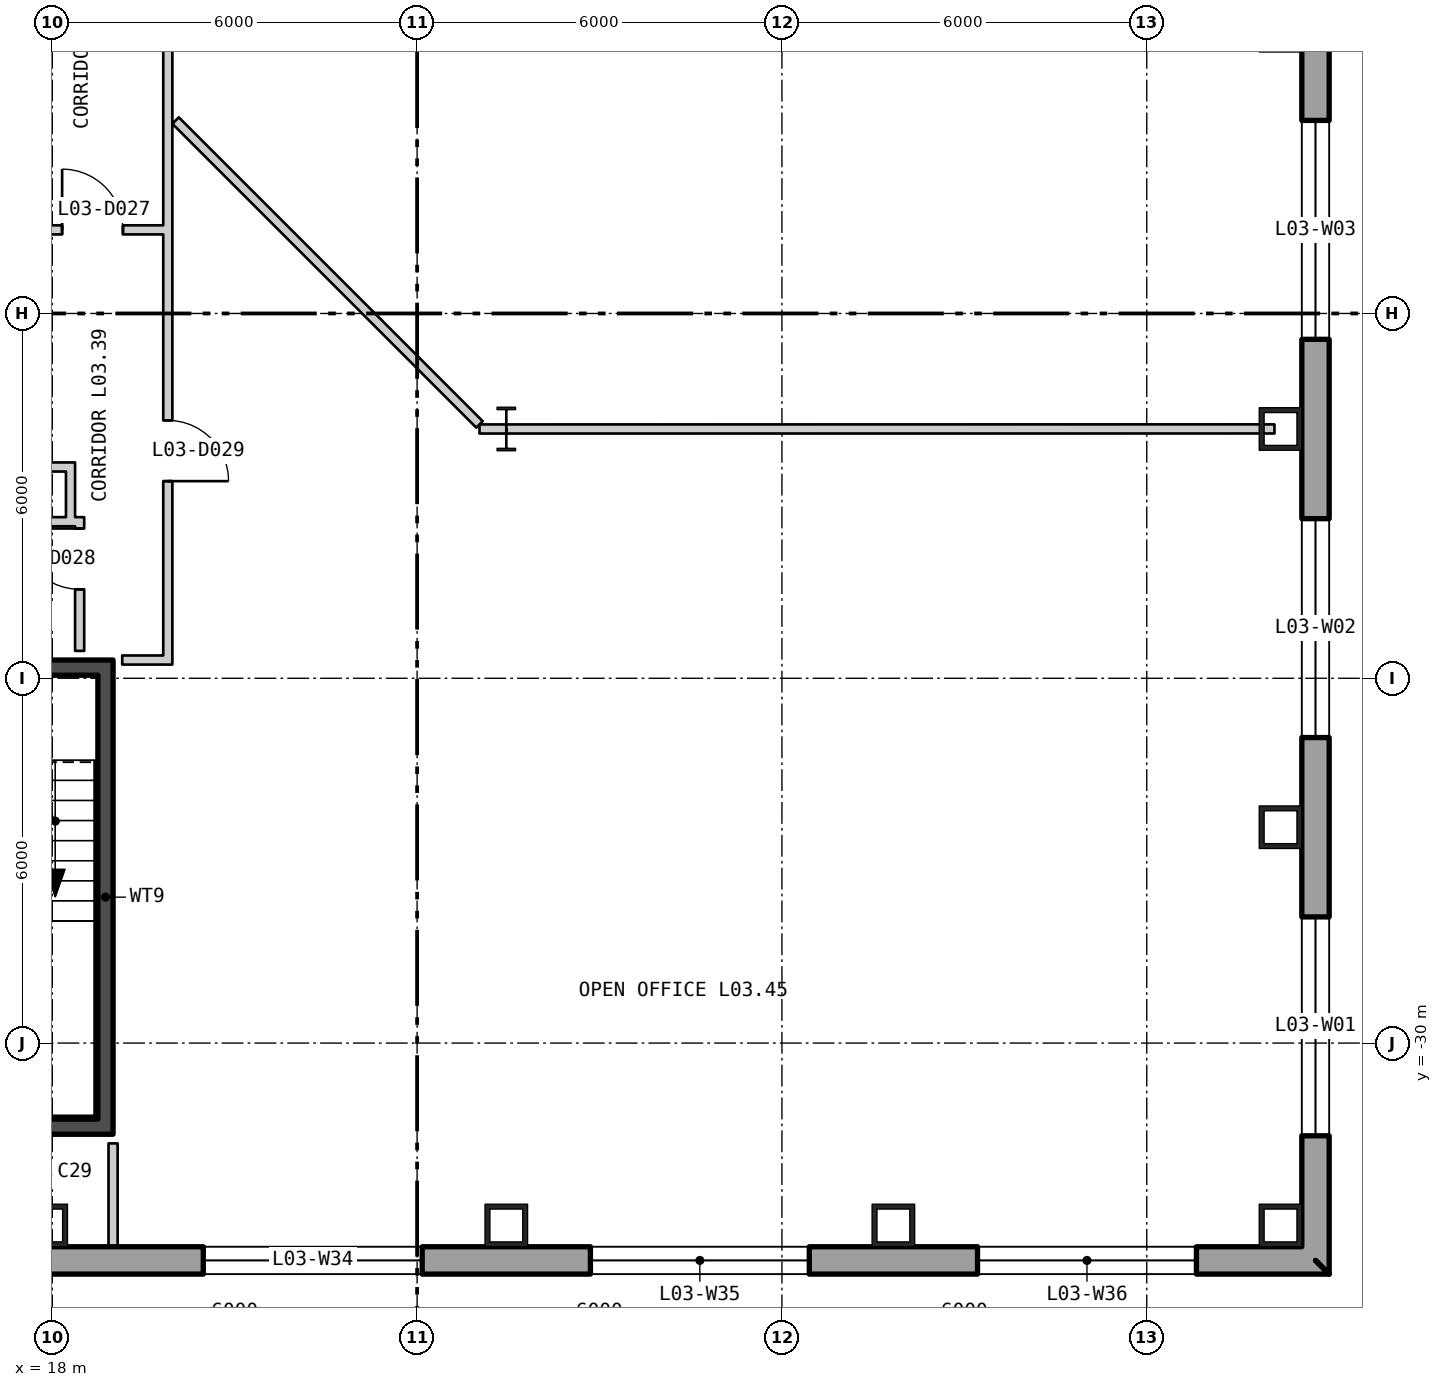
"""IFC4 building model, lengths in metres.
Left out: names, types, materials, properties, quantities, classifications, styles, units other than length and angle.
Written with IfcOpenShell. Run it as: python <this file> out.ifc"""

import sys

from ifc_helpers import new_model, si_unit, direction, frame, frame_2d, origin, origin_2d, place, context, subcontext, project, spatial, polyline, rectangle, hollow_rectangle, i_section, outline, extrude, element, fill, save


model = new_model("IFC4")
c1 = context("Model", 3, precision=1e-05, world=origin(), true_north=direction((0.0, 1.0)))
c2 = subcontext(c1, "Body", "Model", "MODEL_VIEW")
j1 = project(units=[si_unit("LENGTHUNIT", "METRE"), si_unit("PLANEANGLEUNIT", "RADIAN")], contexts=[c1])
p1 = place(None, origin())
s1 = spatial("IfcSite", under=j1, at=p1, CompositionType="ELEMENT")
p2 = place(p1, origin())
s2 = spatial("IfcBuilding", under=s1, at=p2, CompositionType="ELEMENT")
p3 = place(p2, frame((0.0, 0.0, 18.6)))
s3 = spatial("IfcBuildingStorey", under=s2, at=p3, CompositionType="ELEMENT", Elevation=18.6)
for number, where, z_axis, x_axis in (
    (1, (38.2, -33.0, 0.0), (0.0, 0.0, 1.0), (0.0, 1.0, 0.0)),
    (2, (38.2, -26.45, 0.0), (0.0, 0.0, 1.0), (0.0, 1.0, 0.0)),
    (3, (38.2, -19.9, 0.0), (0.0, 0.0, 1.0), (0.0, 1.0, 0.0)),
    (4, (17.9, -33.0, 0.0), (0.0, 0.0, 1.0), (1.0, 0.0, 0.0)),
    (5, (25.467, -33.0, 0.0), (0.0, 0.0, 1.0), (1.0, 0.0, 0.0)),
    (6, (31.833, -33.0, 0.0), (0.0, 0.0, 1.0), (1.0, 0.0, 0.0)),
):
    element("IfcColumn", number, at=place(p3, frame(where, z_axis=z_axis, x_axis=x_axis)), inside=s3, PredefinedType="COLUMN", context=c2, shape_type="SweptSolid", body=[
        extrude(hollow_rectangle(XDim=0.7, YDim=0.7, WallThickness=0.08, at=origin_2d()), origin(), (0.0, 0.0, 1.0), 5.1),
    ])
p4 = place(p3, frame((25.467, -19.9, 0.0), z_axis=(0.0, 0.0, 1.0), x_axis=(1.0, 0.0, 0.0)))
e7 = element("IfcColumn", 7, at=p4, inside=s3, PredefinedType="COLUMN", context=c2, shape_type="SweptSolid", body=[
    extrude(i_section(OverallWidth=0.304, OverallDepth=0.716, WebThickness=0.021, FlangeThickness=0.04, at=origin_2d()), origin(), (0.0, 0.0, 1.0), 5.1),
])
p5 = place(p3, frame((38.775, -33.575, -0.4), z_axis=(0.0, 0.0, 1.0), x_axis=(0.0, 1.0, 0.0)))
e8 = element("IfcWall", 8, at=p5, inside=s3, PredefinedType="SOLIDWALL", context=c2, shape_type="SweptSolid", body=[
    extrude(outline(polyline([(-0.225, -0.225), (53.775, -0.225), (53.325, 0.225), (0.225, 0.225), (-0.225, -0.225)])), origin(), (0.0, 0.0, 1.0), 5.1),
])
p6 = place(p5, frame((2.05, 0.0, 1.3)))
e9 = element("IfcOpeningElement", 9, at=p6, cuts=e8, PredefinedType="OPENING", context=c2, shape_type="SweptSolid", body=[
    extrude(rectangle(XDim=3.6, YDim=3.2, at=frame_2d((1.8, 1.6))), frame((0.0, 0.235, 0.0), z_axis=(0.0, -1.0, 0.0), x_axis=(1.0, 0.0, 0.0)), (0.0, 0.0, 1.0), 0.47),
])
p7 = place(p5, frame((8.6, 0.0, 1.3)))
e10 = element("IfcOpeningElement", 10, at=p7, cuts=e8, PredefinedType="OPENING", context=c2, shape_type="SweptSolid", body=[
    extrude(rectangle(XDim=3.6, YDim=3.2, at=frame_2d((1.8, 1.6))), frame((0.0, 0.235, 0.0), z_axis=(0.0, -1.0, 0.0), x_axis=(1.0, 0.0, 0.0)), (0.0, 0.0, 1.0), 0.47),
])
p8 = place(p5, frame((15.15, 0.0, 1.3)))
e11 = element("IfcOpeningElement", 11, at=p8, cuts=e8, PredefinedType="OPENING", context=c2, shape_type="SweptSolid", body=[
    extrude(rectangle(XDim=3.6, YDim=3.2, at=frame_2d((1.8, 1.6))), frame((0.0, 0.235, 0.0), z_axis=(0.0, -1.0, 0.0), x_axis=(1.0, 0.0, 0.0)), (0.0, 0.0, 1.0), 0.47),
])
p9 = place(p5, frame((21.7, 0.0, 1.3)))
e12 = element("IfcOpeningElement", 12, at=p9, cuts=e8, PredefinedType="OPENING", context=c2, shape_type="SweptSolid", body=[
    extrude(rectangle(XDim=3.6, YDim=3.2, at=frame_2d((1.8, 1.6))), frame((0.0, 0.235, 0.0), z_axis=(0.0, -1.0, 0.0), x_axis=(1.0, 0.0, 0.0)), (0.0, 0.0, 1.0), 0.47),
])
p10 = place(p5, frame((28.25, 0.0, 1.3)))
e13 = element("IfcOpeningElement", 13, at=p10, cuts=e8, PredefinedType="OPENING", context=c2, shape_type="SweptSolid", body=[
    extrude(rectangle(XDim=3.6, YDim=3.2, at=frame_2d((1.8, 1.6))), frame((0.0, 0.235, 0.0), z_axis=(0.0, -1.0, 0.0), x_axis=(1.0, 0.0, 0.0)), (0.0, 0.0, 1.0), 0.47),
])
p11 = place(p5, frame((34.8, 0.0, 1.3)))
e14 = element("IfcOpeningElement", 14, at=p11, cuts=e8, PredefinedType="OPENING", context=c2, shape_type="SweptSolid", body=[
    extrude(rectangle(XDim=3.6, YDim=3.2, at=frame_2d((1.8, 1.6))), frame((0.0, 0.235, 0.0), z_axis=(0.0, -1.0, 0.0), x_axis=(1.0, 0.0, 0.0)), (0.0, 0.0, 1.0), 0.47),
])
p12 = place(p5, frame((41.35, 0.0, 1.3)))
e15 = element("IfcOpeningElement", 15, at=p12, cuts=e8, PredefinedType="OPENING", context=c2, shape_type="SweptSolid", body=[
    extrude(rectangle(XDim=3.6, YDim=3.2, at=frame_2d((1.8, 1.6))), frame((0.0, 0.235, 0.0), z_axis=(0.0, -1.0, 0.0), x_axis=(1.0, 0.0, 0.0)), (0.0, 0.0, 1.0), 0.47),
])
p13 = place(p5, frame((47.9, 0.0, 1.3)))
e16 = element("IfcOpeningElement", 16, at=p13, cuts=e8, PredefinedType="OPENING", context=c2, shape_type="SweptSolid", body=[
    extrude(rectangle(XDim=3.6, YDim=3.2, at=frame_2d((1.8, 1.6))), frame((0.0, 0.235, 0.0), z_axis=(0.0, -1.0, 0.0), x_axis=(1.0, 0.0, 0.0)), (0.0, 0.0, 1.0), 0.47),
])
p14 = place(p3, frame((-38.775, -33.575, -0.4), z_axis=(0.0, 0.0, 1.0), x_axis=(1.0, 0.0, 0.0)))
e17 = element("IfcWall", 17, at=p14, inside=s3, PredefinedType="SOLIDWALL", context=c2, shape_type="SweptSolid", body=[
    extrude(outline(polyline([(-0.225, -0.225), (77.775, -0.225), (77.325, 0.225), (0.225, 0.225), (-0.225, -0.225)])), origin(), (0.0, 0.0, 1.0), 5.1),
])
p15 = place(p14, frame((1.958, 0.0, 1.3)))
e18 = element("IfcOpeningElement", 18, at=p15, cuts=e17, PredefinedType="OPENING", context=c2, shape_type="SweptSolid", body=[
    extrude(rectangle(XDim=3.6, YDim=3.2, at=frame_2d((1.8, 1.6))), frame((0.0, 0.235, 0.0), z_axis=(0.0, -1.0, 0.0), x_axis=(1.0, 0.0, 0.0)), (0.0, 0.0, 1.0), 0.47),
])
p16 = place(p14, frame((8.325, 0.0, 1.3)))
e19 = element("IfcOpeningElement", 19, at=p16, cuts=e17, PredefinedType="OPENING", context=c2, shape_type="SweptSolid", body=[
    extrude(rectangle(XDim=3.6, YDim=3.2, at=frame_2d((1.8, 1.6))), frame((0.0, 0.235, 0.0), z_axis=(0.0, -1.0, 0.0), x_axis=(1.0, 0.0, 0.0)), (0.0, 0.0, 1.0), 0.47),
])
p17 = place(p14, frame((14.692, 0.0, 1.3)))
e20 = element("IfcOpeningElement", 20, at=p17, cuts=e17, PredefinedType="OPENING", context=c2, shape_type="SweptSolid", body=[
    extrude(rectangle(XDim=3.6, YDim=3.2, at=frame_2d((1.8, 1.6))), frame((0.0, 0.235, 0.0), z_axis=(0.0, -1.0, 0.0), x_axis=(1.0, 0.0, 0.0)), (0.0, 0.0, 1.0), 0.47),
])
p18 = place(p14, frame((21.325, 0.0, 1.3)))
e21 = element("IfcOpeningElement", 21, at=p18, cuts=e17, PredefinedType="OPENING", context=c2, shape_type="SweptSolid", body=[
    extrude(rectangle(XDim=3.6, YDim=3.2, at=frame_2d((1.8, 1.6))), frame((0.0, 0.235, 0.0), z_axis=(0.0, -1.0, 0.0), x_axis=(1.0, 0.0, 0.0)), (0.0, 0.0, 1.0), 0.47),
])
p19 = place(p14, frame((27.425, 0.0, 1.3)))
e22 = element("IfcOpeningElement", 22, at=p19, cuts=e17, PredefinedType="OPENING", context=c2, shape_type="SweptSolid", body=[
    extrude(rectangle(XDim=3.6, YDim=3.2, at=frame_2d((1.8, 1.6))), frame((0.0, 0.235, 0.0), z_axis=(0.0, -1.0, 0.0), x_axis=(1.0, 0.0, 0.0)), (0.0, 0.0, 1.0), 0.47),
])
p20 = place(p14, frame((33.792, 0.0, 1.3)))
e23 = element("IfcOpeningElement", 23, at=p20, cuts=e17, PredefinedType="OPENING", context=c2, shape_type="SweptSolid", body=[
    extrude(rectangle(XDim=3.6, YDim=3.2, at=frame_2d((1.8, 1.6))), frame((0.0, 0.235, 0.0), z_axis=(0.0, -1.0, 0.0), x_axis=(1.0, 0.0, 0.0)), (0.0, 0.0, 1.0), 0.47),
])
p21 = place(p14, frame((40.158, 0.0, 1.3)))
e24 = element("IfcOpeningElement", 24, at=p21, cuts=e17, PredefinedType="OPENING", context=c2, shape_type="SweptSolid", body=[
    extrude(rectangle(XDim=3.6, YDim=3.2, at=frame_2d((1.8, 1.6))), frame((0.0, 0.235, 0.0), z_axis=(0.0, -1.0, 0.0), x_axis=(1.0, 0.0, 0.0)), (0.0, 0.0, 1.0), 0.47),
])
p22 = place(p14, frame((46.525, 0.0, 1.3)))
e25 = element("IfcOpeningElement", 25, at=p22, cuts=e17, PredefinedType="OPENING", context=c2, shape_type="SweptSolid", body=[
    extrude(rectangle(XDim=3.6, YDim=3.2, at=frame_2d((1.8, 1.6))), frame((0.0, 0.235, 0.0), z_axis=(0.0, -1.0, 0.0), x_axis=(1.0, 0.0, 0.0)), (0.0, 0.0, 1.0), 0.47),
])
p23 = place(p14, frame((52.625, 0.0, 1.3)))
e26 = element("IfcOpeningElement", 26, at=p23, cuts=e17, PredefinedType="OPENING", context=c2, shape_type="SweptSolid", body=[
    extrude(rectangle(XDim=3.6, YDim=3.2, at=frame_2d((1.8, 1.6))), frame((0.0, 0.235, 0.0), z_axis=(0.0, -1.0, 0.0), x_axis=(1.0, 0.0, 0.0)), (0.0, 0.0, 1.0), 0.47),
])
p24 = place(p14, frame((59.258, 0.0, 1.3)))
e27 = element("IfcOpeningElement", 27, at=p24, cuts=e17, PredefinedType="OPENING", context=c2, shape_type="SweptSolid", body=[
    extrude(rectangle(XDim=3.6, YDim=3.2, at=frame_2d((1.8, 1.6))), frame((0.0, 0.235, 0.0), z_axis=(0.0, -1.0, 0.0), x_axis=(1.0, 0.0, 0.0)), (0.0, 0.0, 1.0), 0.47),
])
p25 = place(p14, frame((65.625, 0.0, 1.3)))
e28 = element("IfcOpeningElement", 28, at=p25, cuts=e17, PredefinedType="OPENING", context=c2, shape_type="SweptSolid", body=[
    extrude(rectangle(XDim=3.6, YDim=3.2, at=frame_2d((1.8, 1.6))), frame((0.0, 0.235, 0.0), z_axis=(0.0, -1.0, 0.0), x_axis=(1.0, 0.0, 0.0)), (0.0, 0.0, 1.0), 0.47),
])
p26 = place(p14, frame((71.992, 0.0, 1.3)))
e29 = element("IfcOpeningElement", 29, at=p26, cuts=e17, PredefinedType="OPENING", context=c2, shape_type="SweptSolid", body=[
    extrude(rectangle(XDim=3.6, YDim=3.2, at=frame_2d((1.8, 1.6))), frame((0.0, 0.235, 0.0), z_axis=(0.0, -1.0, 0.0), x_axis=(1.0, 0.0, 0.0)), (0.0, 0.0, 1.0), 0.47),
])
p27 = place(p3, frame((18.875, -31.25, 0.0), z_axis=(0.0, 0.0, 1.0), x_axis=(0.0, 1.0, 0.0)))
e30 = element("IfcWall", 30, at=p27, inside=s3, PredefinedType="SHEAR", context=c2, shape_type="SweptSolid", body=[
    extrude(rectangle(XDim=7.3, YDim=0.25, at=frame_2d((3.65, 0.0))), origin(), (0.0, 0.0, 1.0), 4.88),
])
p28 = place(p3, frame((15.5, -31.375, 0.0), z_axis=(0.0, 0.0, 1.0), x_axis=(1.0, 0.0, 0.0)))
e31 = element("IfcWall", 31, at=p28, inside=s3, PredefinedType="SHEAR", context=c2, shape_type="SweptSolid", body=[
    extrude(rectangle(XDim=3.5, YDim=0.25, at=frame_2d((1.75, 0.0))), origin(), (0.0, 0.0, 1.0), 4.88),
])
p29 = place(p3, frame((15.5, -23.825, 0.0), z_axis=(0.0, 0.0, 1.0), x_axis=(1.0, 0.0, 0.0)))
e32 = element("IfcWall", 32, at=p29, inside=s3, PredefinedType="SHEAR", context=c2, shape_type="SweptSolid", body=[
    extrude(rectangle(XDim=3.5, YDim=0.25, at=frame_2d((1.75, 0.0))), origin(), (0.0, 0.0, 1.0), 4.88),
])
p30 = place(p29, frame((1.15, 0.0, 0.0)))
e33 = element("IfcOpeningElement", 33, at=p30, cuts=e32, PredefinedType="OPENING", context=c2, shape_type="SweptSolid", body=[
    extrude(rectangle(XDim=1.2, YDim=2.1, at=frame_2d((0.6, 1.05))), frame((0.0, 0.135, 0.0), z_axis=(0.0, -1.0, 0.0), x_axis=(1.0, 0.0, 0.0)), (0.0, 0.0, 1.0), 0.27),
])
p31 = place(p3, frame((17.5, -16.625, 0.0), z_axis=(0.0, 0.0, 1.0), x_axis=(1.0, 0.0, 0.0)))
e34 = element("IfcWall", 34, at=p31, inside=s3, PredefinedType="PARTITIONING", context=c2, shape_type="SweptSolid", body=[
    extrude(rectangle(XDim=2.325, YDim=0.15, at=frame_2d((1.163, 0.0))), origin(), (0.0, 0.0, 1.0), 4.88),
])
p32 = place(p31, frame((0.662, 0.0, 0.0)))
e35 = element("IfcOpeningElement", 35, at=p32, cuts=e34, PredefinedType="OPENING", context=c2, shape_type="SweptSolid", body=[
    extrude(rectangle(XDim=1.0, YDim=2.1, at=frame_2d((0.5, 1.05))), frame((0.0, 0.085, 0.0), z_axis=(0.0, -1.0, 0.0), x_axis=(1.0, 0.0, 0.0)), (0.0, 0.0, 1.0), 0.17),
])
for number, where, z_axis, x_axis in (
    (36, (17.575, -21.425, 0.0), (0.0, 0.0, 1.0), (1.0, 0.0, 0.0)),
    (37, (17.575, -20.525, 0.0), (0.0, 0.0, 1.0), (1.0, 0.0, 0.0)),
):
    element("IfcWall", number, at=place(p3, frame(where, z_axis=z_axis, x_axis=x_axis)), inside=s3, PredefinedType="PARTITIONING", context=c2, shape_type="SweptSolid", body=[
        extrude(rectangle(XDim=0.65, YDim=0.15, at=frame_2d((0.325, 0.0))), origin(), (0.0, 0.0, 1.0), 4.88),
    ])
p33 = place(p3, frame((18.3, -21.5, 0.0), z_axis=(0.0, 0.0, 1.0), x_axis=(0.0, 1.0, 0.0)))
e38 = element("IfcWall", 38, at=p33, inside=s3, PredefinedType="PARTITIONING", context=c2, shape_type="SweptSolid", body=[
    extrude(rectangle(XDim=1.05, YDim=0.15, at=frame_2d((0.525, 0.0))), origin(), (0.0, 0.0, 1.0), 4.88),
])
p34 = place(p3, frame((18.45, -23.55, 0.0), z_axis=(0.0, 0.0, 1.0), x_axis=(0.0, 1.0, 0.0)))
e39 = element("IfcWall", 39, at=p34, inside=s3, PredefinedType="PARTITIONING", context=c2, shape_type="SweptSolid", body=[
    extrude(rectangle(XDim=2.2, YDim=0.15, at=frame_2d((1.1, 0.0))), origin(), (0.0, 0.0, 1.0), 4.88),
])
p35 = place(p34, frame((1.013, 0.0, 0.0)))
e40 = element("IfcOpeningElement", 40, at=p35, cuts=e39, PredefinedType="OPENING", context=c2, shape_type="SweptSolid", body=[
    extrude(rectangle(XDim=1.0, YDim=2.1, at=frame_2d((0.5, 1.05))), frame((0.0, 0.085, 0.0), z_axis=(0.0, -1.0, 0.0), x_axis=(1.0, 0.0, 0.0)), (0.0, 0.0, 1.0), 0.17),
])
p36 = place(p3, frame((19.0, -33.348, 0.0), z_axis=(0.0, 0.0, 1.0), x_axis=(0.0, 1.0, 0.0)))
e41 = element("IfcWall", 41, at=p36, inside=s3, PredefinedType="PARTITIONING", context=c2, shape_type="SweptSolid", body=[
    extrude(rectangle(XDim=0.448, YDim=0.15, at=frame_2d((0.224, 0.0))), origin(), (0.0, 0.0, 1.0), 4.88),
])
p37 = place(p3, frame((19.0, -32.9, 0.0), z_axis=(0.0, 0.0, 1.0), x_axis=(0.0, 1.0, 0.0)))
e42 = element("IfcWall", 42, at=p37, inside=s3, PredefinedType="PARTITIONING", context=c2, shape_type="SweptSolid", body=[
    extrude(rectangle(XDim=1.25, YDim=0.15, at=frame_2d((0.625, 0.0))), origin(), (0.0, 0.0, 1.0), 4.19),
])
p38 = place(p3, frame((19.15, -23.7, 0.0), z_axis=(0.0, 0.0, 1.0), x_axis=(1.0, 0.0, 0.0)))
e43 = element("IfcWall", 43, at=p38, inside=s3, PredefinedType="PARTITIONING", context=c2, shape_type="SweptSolid", body=[
    extrude(rectangle(XDim=0.675, YDim=0.15, at=frame_2d((0.338, 0.0))), origin(), (0.0, 0.0, 1.0), 4.88),
])
p39 = place(p3, frame((19.9, -23.775, 0.0), z_axis=(0.0, 0.0, 1.0), x_axis=(0.0, 1.0, 0.0)))
e44 = element("IfcWall", 44, at=p39, inside=s3, PredefinedType="PARTITIONING", context=c2, shape_type="SweptSolid", body=[
    extrude(rectangle(XDim=21.187, YDim=0.15, at=frame_2d((10.594, 0.0))), origin(), (0.0, 0.0, 1.0), 4.88),
])
p40 = place(p39, frame((3.017, 0.0, 0.0)))
e45 = element("IfcOpeningElement", 45, at=p40, cuts=e44, PredefinedType="OPENING", context=c2, shape_type="SweptSolid", body=[
    extrude(rectangle(XDim=1.0, YDim=2.1, at=frame_2d((0.5, 1.05))), frame((0.0, 0.085, 0.0), z_axis=(0.0, -1.0, 0.0), x_axis=(1.0, 0.0, 0.0)), (0.0, 0.0, 1.0), 0.17),
])
p41 = place(p39, frame((12.423, 0.0, 0.0)))
e46 = element("IfcOpeningElement", 46, at=p41, cuts=e44, PredefinedType="OPENING", context=c2, shape_type="SweptSolid", body=[
    extrude(rectangle(XDim=1.0, YDim=2.1, at=frame_2d((0.5, 1.05))), frame((0.0, 0.085, 0.0), z_axis=(0.0, -1.0, 0.0), x_axis=(1.0, 0.0, 0.0)), (0.0, 0.0, 1.0), 0.17),
])
p42 = place(p3, frame((20.028, -14.827, 0.0), z_axis=(0.0, 0.0, 1.0), x_axis=(0.707106781187, -0.707106781187, 0.0)))
e47 = element("IfcWall", 47, at=p42, inside=s3, PredefinedType="PARTITIONING", context=c2, shape_type="SweptSolid", body=[
    extrude(rectangle(XDim=7.068, YDim=0.15, at=frame_2d((3.534, 0.0))), origin(), (0.0, 0.0, 1.0), 4.88),
])
p43 = place(p3, frame((25.026, -19.9, 0.0), z_axis=(0.0, 0.0, 1.0), x_axis=(1.0, 0.0, 0.0)))
e48 = element("IfcWall", 48, at=p43, inside=s3, PredefinedType="PARTITIONING", context=c2, shape_type="SweptSolid", body=[
    extrude(rectangle(XDim=0.441, YDim=0.15, at=frame_2d((0.221, 0.0))), origin(), (0.0, 0.0, 1.0), 4.88),
])
p44 = place(p3, frame((25.467, -19.9, 0.0), z_axis=(0.0, 0.0, 1.0), x_axis=(0.999999996867, 7.9157761e-05, 0.0)))
e49 = element("IfcWall", 49, at=p44, inside=s3, PredefinedType="PARTITIONING", context=c2, shape_type="SweptSolid", body=[
    extrude(rectangle(XDim=12.633, YDim=0.15, at=frame_2d((6.316, 0.0))), origin(), (0.0, 0.0, 1.0), 4.09),
])
p45 = place(p6, origin())
e50 = element("IfcWindow", 50, at=p45, inside=s3, PartitioningType="SINGLE_PANEL", PredefinedType="WINDOW", context=c2, shape_type="SweptSolid", body=[
    extrude(rectangle(XDim=3.6, YDim=3.2, at=frame_2d((1.8, 1.6))), frame((0.0, 0.105, 0.0), z_axis=(0.0, -1.0, 0.0), x_axis=(1.0, 0.0, 0.0)), (0.0, 0.0, 1.0), 0.06),
])
fill(e9, e50)
p46 = place(p7, origin())
e51 = element("IfcWindow", 51, at=p46, inside=s3, PartitioningType="SINGLE_PANEL", PredefinedType="WINDOW", context=c2, shape_type="SweptSolid", body=[
    extrude(rectangle(XDim=3.6, YDim=3.2, at=frame_2d((1.8, 1.6))), frame((0.0, 0.105, 0.0), z_axis=(0.0, -1.0, 0.0), x_axis=(1.0, 0.0, 0.0)), (0.0, 0.0, 1.0), 0.06),
])
fill(e10, e51)
p47 = place(p8, origin())
e52 = element("IfcWindow", 52, at=p47, inside=s3, PartitioningType="SINGLE_PANEL", PredefinedType="WINDOW", context=c2, shape_type="SweptSolid", body=[
    extrude(rectangle(XDim=3.6, YDim=3.2, at=frame_2d((1.8, 1.6))), frame((0.0, 0.105, 0.0), z_axis=(0.0, -1.0, 0.0), x_axis=(1.0, 0.0, 0.0)), (0.0, 0.0, 1.0), 0.06),
])
fill(e11, e52)
p48 = place(p24, origin())
e53 = element("IfcWindow", 53, at=p48, inside=s3, PartitioningType="SINGLE_PANEL", PredefinedType="WINDOW", context=c2, shape_type="SweptSolid", body=[
    extrude(rectangle(XDim=3.6, YDim=3.2, at=frame_2d((1.8, 1.6))), frame((0.0, 0.105, 0.0), z_axis=(0.0, -1.0, 0.0), x_axis=(1.0, 0.0, 0.0)), (0.0, 0.0, 1.0), 0.06),
])
fill(e27, e53)
p49 = place(p25, origin())
e54 = element("IfcWindow", 54, at=p49, inside=s3, PartitioningType="SINGLE_PANEL", PredefinedType="WINDOW", context=c2, shape_type="SweptSolid", body=[
    extrude(rectangle(XDim=3.6, YDim=3.2, at=frame_2d((1.8, 1.6))), frame((0.0, 0.105, 0.0), z_axis=(0.0, -1.0, 0.0), x_axis=(1.0, 0.0, 0.0)), (0.0, 0.0, 1.0), 0.06),
])
fill(e28, e54)
p50 = place(p26, origin())
e55 = element("IfcWindow", 55, at=p50, inside=s3, PartitioningType="SINGLE_PANEL", PredefinedType="WINDOW", context=c2, shape_type="SweptSolid", body=[
    extrude(rectangle(XDim=3.6, YDim=3.2, at=frame_2d((1.8, 1.6))), frame((0.0, 0.105, 0.0), z_axis=(0.0, -1.0, 0.0), x_axis=(1.0, 0.0, 0.0)), (0.0, 0.0, 1.0), 0.06),
])
fill(e29, e55)
p51 = place(p32, origin())
e56 = element("IfcDoor", 56, at=p51, inside=s3, OperationType="SINGLE_SWING_RIGHT", PredefinedType="DOOR", context=c2, shape_type="SweptSolid", body=[
    extrude(rectangle(XDim=1.0, YDim=2.1, at=frame_2d((0.5, 1.05))), frame((0.0, 0.025, 0.0), z_axis=(0.0, -1.0, 0.0), x_axis=(1.0, 0.0, 0.0)), (0.0, 0.0, 1.0), 0.05),
])
fill(e35, e56)
p52 = place(p35, origin())
e57 = element("IfcDoor", 57, at=p52, inside=s3, OperationType="SINGLE_SWING_LEFT", PredefinedType="DOOR", context=c2, shape_type="SweptSolid", body=[
    extrude(rectangle(XDim=1.0, YDim=2.1, at=frame_2d((0.5, 1.05))), frame((0.0, 0.025, 0.0), z_axis=(0.0, -1.0, 0.0), x_axis=(1.0, 0.0, 0.0)), (0.0, 0.0, 1.0), 0.05),
])
fill(e40, e57)
p53 = place(p40, origin())
e58 = element("IfcDoor", 58, at=p53, inside=s3, OperationType="SINGLE_SWING_LEFT", PredefinedType="DOOR", context=c2, shape_type="SweptSolid", body=[
    extrude(rectangle(XDim=1.0, YDim=2.1, at=frame_2d((0.5, 1.05))), frame((0.0, 0.025, 0.0), z_axis=(0.0, -1.0, 0.0), x_axis=(1.0, 0.0, 0.0)), (0.0, 0.0, 1.0), 0.05),
])
fill(e45, e58)
save(model, sys.argv[1])
